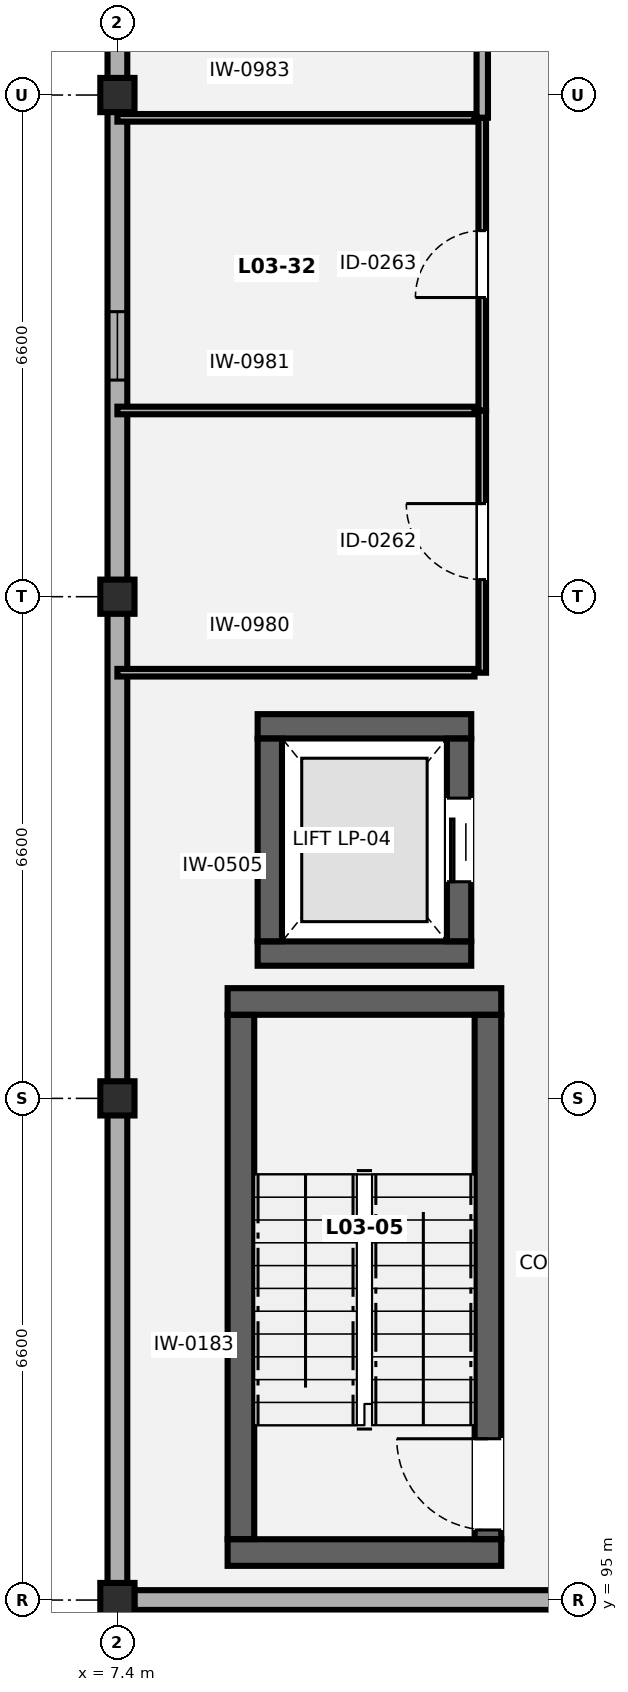
"""IFC4 building model, lengths in metres.
Left out: names, types, materials, properties, quantities, classifications, styles, units other than length and angle.
Written with IfcOpenShell. Run it as: python <this file> out.ifc"""

import sys

from ifc_helpers import new_model, si_unit, direction, frame, frame_2d, origin, origin_2d, place, context, subcontext, project, spatial, rectangle, extrude, element, fill, save


model = new_model("IFC4")
c1 = context("Model", 3, precision=1e-05, world=origin(), true_north=direction((0.0, 1.0)))
c2 = subcontext(c1, "Body", "Model", "MODEL_VIEW")
j1 = project(units=[si_unit("LENGTHUNIT", "METRE"), si_unit("PLANEANGLEUNIT", "RADIAN")], contexts=[c1])
p1 = place(None, origin())
s1 = spatial("IfcSite", under=j1, at=p1, CompositionType="ELEMENT")
p2 = place(p1, origin())
s2 = spatial("IfcBuilding", under=s1, at=p2, CompositionType="ELEMENT")
p3 = place(p2, frame((0.0, 0.0, 13.3)))
s3 = spatial("IfcBuildingStorey", under=s2, at=p3, CompositionType="ELEMENT", Elevation=13.3)
for number, where, z_axis, x_axis in (
    (1, (7.4, 95.0, 0.0), (0.0, 0.0, 1.0), (1.0, 0.0, 0.0)),
    (2, (7.4, 101.6, 0.0), (0.0, 0.0, 1.0), (1.0, 0.0, 0.0)),
    (3, (7.4, 108.2, 0.0), (0.0, 0.0, 1.0), (1.0, 0.0, 0.0)),
    (4, (7.4, 114.8, 0.0), (0.0, 0.0, 1.0), (1.0, 0.0, 0.0)),
):
    element("IfcColumn", number, at=place(p3, frame(where, z_axis=z_axis, x_axis=x_axis)), inside=s3, PredefinedType="PILASTER", context=c2, shape_type="SweptSolid", body=[
        extrude(rectangle(XDim=0.45, YDim=0.45, at=origin_2d()), origin(), (0.0, 0.0, 1.0), 4.2),
    ])
p4 = place(p3, frame((7.4, 95.223, 0.0), z_axis=(0.0, 0.0, 1.0), x_axis=(0.0, 1.0, 0.0)))
e5 = element("IfcWall", 5, at=p4, inside=s3, PredefinedType="SOLIDWALL", context=c2, shape_type="SweptSolid", body=[
    extrude(rectangle(XDim=66.754, YDim=0.26, at=frame_2d((33.377, 0.0))), origin(), (0.0, 0.0, 1.0), 2.885),
])
p5 = place(p4, frame((15.827, 0.0, 0.85)))
e6 = element("IfcOpeningElement", 6, at=p5, cuts=e5, PredefinedType="OPENING", context=c2, shape_type="SweptSolid", body=[
    extrude(rectangle(XDim=0.9, YDim=1.35, at=frame_2d((0.45, 0.675))), frame((0.0, 0.14, 0.0), z_axis=(0.0, -1.0, 0.0), x_axis=(1.0, 0.0, 0.0)), (0.0, 0.0, 1.0), 0.28),
])
p6 = place(p4, frame((29.027, 0.0, 0.85)))
e7 = element("IfcOpeningElement", 7, at=p6, cuts=e5, PredefinedType="OPENING", context=c2, shape_type="SweptSolid", body=[
    extrude(rectangle(XDim=0.9, YDim=1.35, at=frame_2d((0.45, 0.675))), frame((0.0, 0.14, 0.0), z_axis=(0.0, -1.0, 0.0), x_axis=(1.0, 0.0, 0.0)), (0.0, 0.0, 1.0), 0.28),
])
p7 = place(p4, frame((42.227, 0.0, 0.85)))
e8 = element("IfcOpeningElement", 8, at=p7, cuts=e5, PredefinedType="OPENING", context=c2, shape_type="SweptSolid", body=[
    extrude(rectangle(XDim=0.9, YDim=1.35, at=frame_2d((0.45, 0.675))), frame((0.0, 0.14, 0.0), z_axis=(0.0, -1.0, 0.0), x_axis=(1.0, 0.0, 0.0)), (0.0, 0.0, 1.0), 0.28),
])
p8 = place(p4, frame((55.427, 0.0, 0.85)))
e9 = element("IfcOpeningElement", 9, at=p8, cuts=e5, PredefinedType="OPENING", context=c2, shape_type="SweptSolid", body=[
    extrude(rectangle(XDim=0.9, YDim=1.35, at=frame_2d((0.45, 0.675))), frame((0.0, 0.14, 0.0), z_axis=(0.0, -1.0, 0.0), x_axis=(1.0, 0.0, 0.0)), (0.0, 0.0, 1.0), 0.28),
])
p9 = place(p3, frame((26.977, 95.0, 0.0), z_axis=(0.0, 0.0, 1.0), x_axis=(-1.0, 0.0, 0.0)))
e10 = element("IfcWall", 10, at=p9, inside=s3, PredefinedType="SOLIDWALL", context=c2, shape_type="SweptSolid", body=[
    extrude(rectangle(XDim=19.354, YDim=0.26, at=frame_2d((9.677, 0.0))), origin(), (0.0, 0.0, 1.0), 2.48),
])
p10 = place(p9, frame((1.577, 0.0, 0.85)))
e11 = element("IfcOpeningElement", 11, at=p10, cuts=e10, PredefinedType="OPENING", context=c2, shape_type="SweptSolid", body=[
    extrude(rectangle(XDim=1.7, YDim=1.4, at=frame_2d((0.85, 0.7))), frame((0.0, 0.14, 0.0), z_axis=(0.0, -1.0, 0.0), x_axis=(1.0, 0.0, 0.0)), (0.0, 0.0, 1.0), 0.28),
])
for number, where, z_axis, x_axis in (
    (12, (8.85, 95.625, 0.0), (0.0, 0.0, 1.0), (1.0, 0.0, 0.0)),
    (13, (8.85, 102.875, 0.0), (0.0, 0.0, 1.0), (1.0, 0.0, 0.0)),
):
    element("IfcWall", number, at=place(p3, frame(where, z_axis=z_axis, x_axis=x_axis)), inside=s3, PredefinedType="SHEAR", context=c2, shape_type="SweptSolid", body=[
        extrude(rectangle(XDim=3.6, YDim=0.35, at=frame_2d((1.8, 0.0))), origin(), (0.0, 0.0, 1.0), 3.85),
    ])
p11 = place(p3, frame((9.025, 95.802, 0.0), z_axis=(0.0, 0.0, 1.0), x_axis=(0.0, 1.0, 0.0)))
e14 = element("IfcWall", 14, at=p11, inside=s3, PredefinedType="SHEAR", context=c2, shape_type="SweptSolid", body=[
    extrude(rectangle(XDim=6.896, YDim=0.35, at=frame_2d((3.448, 0.0))), origin(), (0.0, 0.0, 1.0), 3.85),
])
p12 = place(p3, frame((12.275, 95.802, 0.0), z_axis=(0.0, 0.0, 1.0), x_axis=(0.0, 1.0, 0.0)))
e15 = element("IfcWall", 15, at=p12, inside=s3, PredefinedType="SHEAR", context=c2, shape_type="SweptSolid", body=[
    extrude(rectangle(XDim=6.896, YDim=0.35, at=frame_2d((3.448, 0.0))), origin(), (0.0, 0.0, 1.0), 3.85),
])
p13 = place(p12, frame((0.12, 0.0, 0.0)))
e16 = element("IfcOpeningElement", 16, at=p13, cuts=e15, PredefinedType="OPENING", context=c2, shape_type="SweptSolid", body=[
    extrude(rectangle(XDim=1.2, YDim=2.15, at=frame_2d((0.6, 1.075))), frame((0.0, 0.185, 0.0), z_axis=(0.0, -1.0, 0.0), x_axis=(1.0, 0.0, 0.0)), (0.0, 0.0, 1.0), 0.37),
])
for number, where, z_axis, x_axis in (
    (17, (9.245, 103.505, 0.0), (0.0, 0.0, 1.0), (1.0, 0.0, 0.0)),
    (18, (9.245, 106.495, 0.0), (0.0, 0.0, 1.0), (1.0, 0.0, 0.0)),
):
    element("IfcWall", number, at=place(p3, frame(where, z_axis=z_axis, x_axis=x_axis)), inside=s3, PredefinedType="SHEAR", context=c2, shape_type="SweptSolid", body=[
        extrude(rectangle(XDim=2.81, YDim=0.32, at=frame_2d((1.405, 0.0))), origin(), (0.0, 0.0, 1.0), 3.85),
    ])
p14 = place(p3, frame((9.405, 103.667, 0.0), z_axis=(0.0, 0.0, 1.0), x_axis=(0.0, 1.0, 0.0)))
e19 = element("IfcWall", 19, at=p14, inside=s3, PredefinedType="SHEAR", context=c2, shape_type="SweptSolid", body=[
    extrude(rectangle(XDim=2.666, YDim=0.32, at=frame_2d((1.333, 0.0))), origin(), (0.0, 0.0, 1.0), 3.85),
])
p15 = place(p3, frame((11.895, 103.667, 0.0), z_axis=(0.0, 0.0, 1.0), x_axis=(0.0, 1.0, 0.0)))
e20 = element("IfcWall", 20, at=p15, inside=s3, PredefinedType="SHEAR", context=c2, shape_type="SweptSolid", body=[
    extrude(rectangle(XDim=2.666, YDim=0.32, at=frame_2d((1.333, 0.0))), origin(), (0.0, 0.0, 1.0), 3.85),
])
p16 = place(p15, frame((0.783, 0.0, 0.0)))
e21 = element("IfcOpeningElement", 21, at=p16, cuts=e20, PredefinedType="OPENING", context=c2, shape_type="SweptSolid", body=[
    extrude(rectangle(XDim=1.1, YDim=2.15, at=frame_2d((0.55, 1.075))), frame((0.0, 0.17, 0.0), z_axis=(0.0, -1.0, 0.0), x_axis=(1.0, 0.0, 0.0)), (0.0, 0.0, 1.0), 0.34),
])
for number, where, z_axis, x_axis in (
    (22, (7.4, 107.2, 0.0), (0.0, 0.0, 1.0), (1.0, 0.0, 0.0)),
    (23, (7.4, 110.65, 0.0), (0.0, 0.0, 1.0), (1.0, 0.0, 0.0)),
):
    element("IfcWall", number, at=place(p3, frame(where, z_axis=z_axis, x_axis=x_axis)), inside=s3, PredefinedType="PARTITIONING", context=c2, shape_type="SweptSolid", body=[
        extrude(rectangle(XDim=4.698, YDim=0.1, at=frame_2d((2.349, 0.0))), origin(), (0.0, 0.0, 1.0), 3.85),
    ])
p17 = place(p3, frame((12.2, 107.2, 0.0), z_axis=(0.0, 0.0, 1.0), x_axis=(0.0, 1.0, 0.0)))
e24 = element("IfcWall", 24, at=p17, inside=s3, PredefinedType="PARTITIONING", context=c2, shape_type="SweptSolid", body=[
    extrude(rectangle(XDim=3.45, YDim=0.1, at=frame_2d((1.725, 0.0))), origin(), (0.0, 0.0, 1.0), 3.85),
])
p18 = place(p17, frame((1.225, 0.0, 0.0)))
e25 = element("IfcOpeningElement", 25, at=p18, cuts=e24, PredefinedType="OPENING", context=c2, shape_type="SweptSolid", body=[
    extrude(rectangle(XDim=1.0, YDim=2.1, at=frame_2d((0.5, 1.05))), frame((0.0, 0.06, 0.0), z_axis=(0.0, -1.0, 0.0), x_axis=(1.0, 0.0, 0.0)), (0.0, 0.0, 1.0), 0.12),
])
p19 = place(p3, frame((7.4, 114.5, 0.0), z_axis=(0.0, 0.0, 1.0), x_axis=(1.0, 0.0, 0.0)))
e26 = element("IfcWall", 26, at=p19, inside=s3, PredefinedType="PARTITIONING", context=c2, shape_type="SweptSolid", body=[
    extrude(rectangle(XDim=4.698, YDim=0.1, at=frame_2d((2.349, 0.0))), origin(), (0.0, 0.0, 1.0), 2.435),
])
p20 = place(p3, frame((12.2, 110.652, 0.0), z_axis=(0.0, 0.0, 1.0), x_axis=(0.0, 1.0, 0.0)))
e27 = element("IfcWall", 27, at=p20, inside=s3, PredefinedType="PARTITIONING", context=c2, shape_type="SweptSolid", body=[
    extrude(rectangle(XDim=3.848, YDim=0.1, at=frame_2d((1.924, 0.0))), origin(), (0.0, 0.0, 1.0), 3.85),
])
p21 = place(p20, frame((1.484, 0.0, 0.0)))
e28 = element("IfcOpeningElement", 28, at=p21, cuts=e27, PredefinedType="OPENING", context=c2, shape_type="SweptSolid", body=[
    extrude(rectangle(XDim=0.88, YDim=2.08, at=frame_2d((0.44, 1.04))), frame((0.0, 0.06, 0.0), z_axis=(0.0, -1.0, 0.0), x_axis=(1.0, 0.0, 0.0)), (0.0, 0.0, 1.0), 0.12),
])
p22 = place(p3, frame((12.2, 114.502, 0.0), z_axis=(0.0, 0.0, 1.0), x_axis=(0.0, 1.0, 0.0)))
e29 = element("IfcWall", 29, at=p22, inside=s3, PredefinedType="PARTITIONING", context=c2, shape_type="SweptSolid", body=[
    extrude(rectangle(XDim=13.298, YDim=0.15, at=frame_2d((6.649, 0.0))), origin(), (0.0, 0.0, 1.0), 3.85),
])
p23 = place(p22, frame((5.649, 0.0, 0.0)))
e30 = element("IfcOpeningElement", 30, at=p23, cuts=e29, PredefinedType="OPENING", context=c2, shape_type="SweptSolid", body=[
    extrude(rectangle(XDim=1.3, YDim=2.2, at=frame_2d((0.65, 1.1))), frame((0.0, 0.085, 0.0), z_axis=(0.0, -1.0, 0.0), x_axis=(1.0, 0.0, 0.0)), (0.0, 0.0, 1.0), 0.17),
])
p24 = place(p5, origin())
e31 = element("IfcWindow", 31, at=p24, inside=s3, PartitioningType="SINGLE_PANEL", PredefinedType="WINDOW", context=c2, shape_type="SweptSolid", body=[
    extrude(rectangle(XDim=0.9, YDim=1.35, at=frame_2d((0.45, 0.675))), frame((0.0, 0.03, 0.0), z_axis=(0.0, -1.0, 0.0), x_axis=(1.0, 0.0, 0.0)), (0.0, 0.0, 1.0), 0.06),
])
fill(e6, e31)
p25 = place(p13, origin())
e32 = element("IfcDoor", 32, at=p25, inside=s3, OperationType="SINGLE_SWING_RIGHT", PredefinedType="DOOR", context=c2, shape_type="SweptSolid", body=[
    extrude(rectangle(XDim=1.2, YDim=2.15, at=frame_2d((0.6, 1.075))), frame((0.0, 0.025, 0.0), z_axis=(0.0, -1.0, 0.0), x_axis=(1.0, 0.0, 0.0)), (0.0, 0.0, 1.0), 0.05),
])
fill(e16, e32)
p26 = place(p16, origin())
e33 = element("IfcDoor", 33, at=p26, inside=s3, OperationType="SLIDING_TO_LEFT", PredefinedType="DOOR", context=c2, shape_type="SweptSolid", body=[
    extrude(rectangle(XDim=1.1, YDim=2.15, at=frame_2d((0.55, 1.075))), frame((0.0, 0.025, 0.0), z_axis=(0.0, -1.0, 0.0), x_axis=(1.0, 0.0, 0.0)), (0.0, 0.0, 1.0), 0.05),
])
fill(e21, e33)
p27 = place(p18, origin())
e34 = element("IfcDoor", 34, at=p27, inside=s3, OperationType="SINGLE_SWING_RIGHT", PredefinedType="DOOR", context=c2, shape_type="SweptSolid", body=[
    extrude(rectangle(XDim=1.0, YDim=2.1, at=frame_2d((0.5, 1.05))), frame((0.0, 0.025, 0.0), z_axis=(0.0, -1.0, 0.0), x_axis=(1.0, 0.0, 0.0)), (0.0, 0.0, 1.0), 0.05),
])
fill(e25, e34)
p28 = place(p21, origin())
e35 = element("IfcDoor", 35, at=p28, inside=s3, OperationType="SINGLE_SWING_LEFT", PredefinedType="DOOR", context=c2, shape_type="SweptSolid", body=[
    extrude(rectangle(XDim=0.88, YDim=2.08, at=frame_2d((0.44, 1.04))), frame((0.0, 0.025, 0.0), z_axis=(0.0, -1.0, 0.0), x_axis=(1.0, 0.0, 0.0)), (0.0, 0.0, 1.0), 0.05),
])
fill(e28, e35)
save(model, sys.argv[1])
